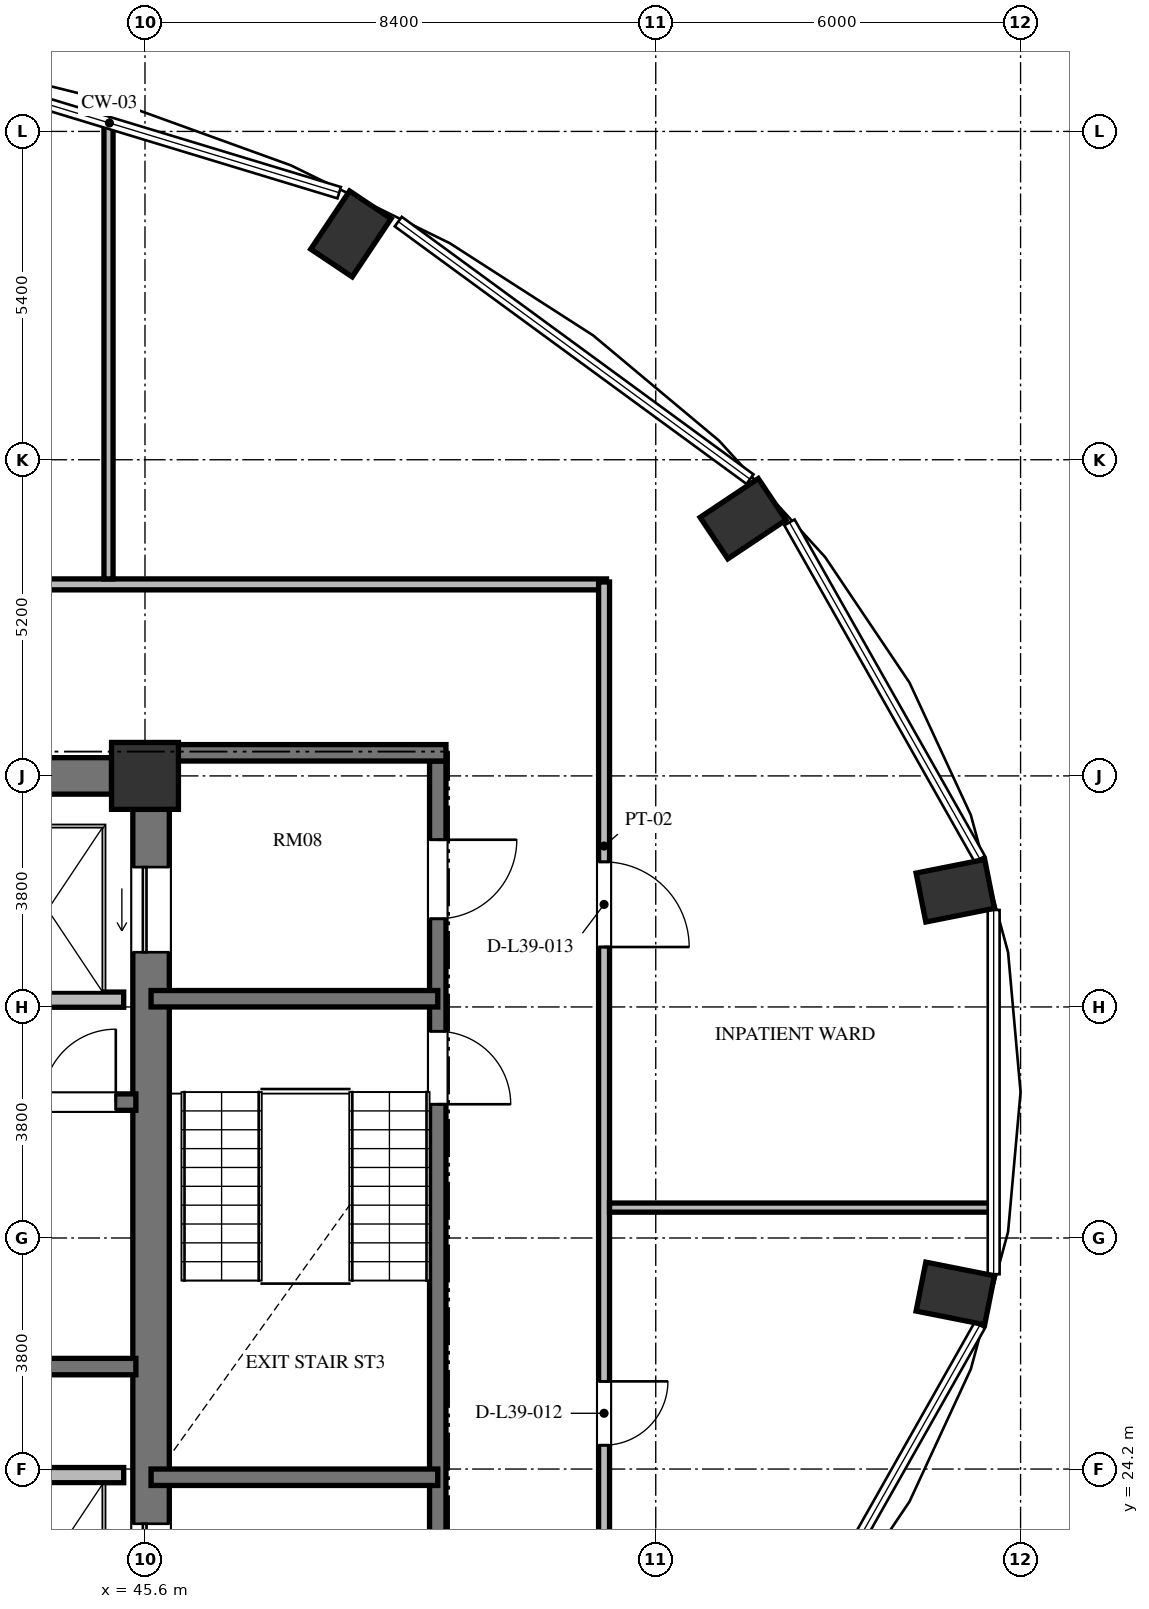
"""IFC4 building model, lengths in metres.
Left out: names, types, materials, properties, quantities, classifications, styles, units other than length and angle.
Written with IfcOpenShell. Run it as: python <this file> out.ifc"""

import sys

from ifc_helpers import new_model, si_unit, direction, frame, frame_2d, origin, origin_2d, place, context, subcontext, project, spatial, rectangle, extrude, element, fill, save


model = new_model("IFC4")
c1 = context("Model", 3, precision=1e-05, world=origin(), true_north=direction((0.0, 1.0)))
c2 = subcontext(c1, "Body", "Model", "MODEL_VIEW")
j1 = project(units=[si_unit("LENGTHUNIT", "METRE"), si_unit("PLANEANGLEUNIT", "RADIAN")], contexts=[c1])
p1 = place(None, origin())
s1 = spatial("IfcSite", under=j1, at=p1, CompositionType="ELEMENT")
p2 = place(p1, origin())
s2 = spatial("IfcBuilding", under=s1, at=p2, CompositionType="ELEMENT")
p3 = place(p2, frame((0.0, 0.0, 152.88)))
s3 = spatial("IfcBuildingStorey", under=s2, at=p3, CompositionType="ELEMENT", Elevation=152.88)
for number, where, z_axis, x_axis in (
    (1, (58.926, 27.088, 0.0), (0.0, 0.0, 1.0), (0.981, -0.195, 0.0)),
    (2, (58.926, 33.712, 0.0), (0.0, 0.0, 1.0), (0.981, 0.195, 0.0)),
    (3, (55.436, 39.831, 0.0), (0.0, 0.0, 1.0), (0.831, 0.556, 0.0)),
    (4, (48.987, 44.514, 0.0), (0.0, 0.0, 1.0), (0.556, 0.831, 0.0)),
):
    element("IfcColumn", number, at=place(p3, frame(where, z_axis=z_axis, x_axis=x_axis)), inside=s3, PredefinedType="COLUMN", context=c2, shape_type="SweptSolid", body=[
        extrude(rectangle(XDim=1.15, YDim=0.82, at=origin_2d()), origin(), (0.0, 0.0, 1.0), 3.648),
    ])
p4 = place(p3, frame((45.6, 35.6, 0.0), z_axis=(0.0, 0.0, 1.0), x_axis=(1.0, 0.0, 0.0)))
e5 = element("IfcColumn", 5, at=p4, inside=s3, PredefinedType="COLUMN", context=c2, shape_type="SweptSolid", body=[
    extrude(rectangle(XDim=1.1, YDim=1.1, at=origin_2d()), origin(), (0.0, 0.0, 1.0), 3.648),
])
p5 = place(p3, frame((45.7, 20.95, 0.0), z_axis=(0.0, 0.0, 1.0), x_axis=(0.0, 1.0, 0.0)))
e6 = element("IfcWall", 6, at=p5, inside=s3, PredefinedType="SHEAR", context=c2, shape_type="SweptSolid", body=[
    extrude(rectangle(XDim=14.1, YDim=0.6, at=frame_2d((7.05, 0.0))), origin(), (0.0, 0.0, 1.0), 3.648),
])
p6 = place(p5, frame((11.75, 0.0, 0.0)))
e7 = element("IfcOpeningElement", 7, at=p6, cuts=e6, PredefinedType="OPENING", context=c2, shape_type="SweptSolid", body=[
    extrude(rectangle(XDim=1.4, YDim=2.3, at=frame_2d((0.7, 1.15))), frame((0.0, 0.31, 0.0), z_axis=(0.0, -1.0, 0.0), x_axis=(1.0, 0.0, 0.0)), (0.0, 0.0, 1.0), 0.62),
])
p7 = place(p5, frame((0.95, 0.0, 0.0)))
e8 = element("IfcOpeningElement", 8, at=p7, cuts=e6, PredefinedType="OPENING", context=c2, shape_type="SweptSolid", body=[
    extrude(rectangle(XDim=1.4, YDim=2.3, at=frame_2d((0.7, 1.15))), frame((0.0, 0.31, 0.0), z_axis=(0.0, -1.0, 0.0), x_axis=(1.0, 0.0, 0.0)), (0.0, 0.0, 1.0), 0.62),
])
p8 = place(p3, frame((39.675, 35.6, 0.0), z_axis=(0.0, 0.0, 1.0), x_axis=(1.0, 0.0, 0.0)))
e9 = element("IfcWall", 9, at=p8, inside=s3, PredefinedType="SHEAR", context=c2, shape_type="SweptSolid", body=[
    extrude(rectangle(XDim=5.375, YDim=0.6, at=frame_2d((2.688, 0.0))), origin(), (0.0, 0.0, 1.0), 3.648),
])
p9 = place(p3, frame((37.465, 30.235, 0.0), z_axis=(0.0, 0.0, 1.0), x_axis=(1.0, 0.0, 0.0)))
e10 = element("IfcWall", 10, at=p9, inside=s3, PredefinedType="SHEAR", context=c2, shape_type="SweptSolid", body=[
    extrude(rectangle(XDim=7.985, YDim=0.27, at=frame_2d((3.992, 0.0))), origin(), (0.0, 0.0, 1.0), 3.648),
])
p10 = place(p9, frame((6.455, 0.0, 0.0)))
e11 = element("IfcOpeningElement", 11, at=p10, cuts=e10, PredefinedType="OPENING", context=c2, shape_type="SweptSolid", body=[
    extrude(rectangle(XDim=1.2, YDim=2.15, at=frame_2d((0.6, 1.075))), frame((0.0, 0.145, 0.0), z_axis=(0.0, -1.0, 0.0), x_axis=(1.0, 0.0, 0.0)), (0.0, 0.0, 1.0), 0.29),
])
p11 = place(p3, frame((37.465, 25.885, 0.0), z_axis=(0.0, 0.0, 1.0), x_axis=(1.0, 0.0, 0.0)))
e12 = element("IfcWall", 12, at=p11, inside=s3, PredefinedType="SHEAR", context=c2, shape_type="SweptSolid", body=[
    extrude(rectangle(XDim=7.985, YDim=0.27, at=frame_2d((3.992, 0.0))), origin(), (0.0, 0.0, 1.0), 3.648),
])
for number, where, z_axis, x_axis in (
    (13, (42.95, 31.92, 0.0), (0.0, 0.0, 1.0), (1.0, 0.0, 0.0)),
    (14, (42.95, 24.1, 0.0), (0.0, 0.0, 1.0), (1.0, 0.0, 0.0)),
):
    element("IfcWall", number, at=place(p3, frame(where, z_axis=z_axis, x_axis=x_axis)), inside=s3, PredefinedType="SOLIDWALL", context=c2, shape_type="SweptSolid", body=[
        extrude(rectangle(XDim=2.3, YDim=0.25, at=frame_2d((1.15, 0.0))), origin(), (0.0, 0.0, 1.0), 3.428),
    ])
p12 = place(p3, frame((50.415, 35.845, 0.0), z_axis=(0.0, 0.0, 1.0), x_axis=(0.0, -1.0, 0.0)))
e15 = element("IfcWall", 15, at=p12, inside=s3, PredefinedType="SHEAR", context=c2, shape_type="SweptSolid", body=[
    extrude(rectangle(XDim=15.825, YDim=0.27, at=frame_2d((7.913, 0.0))), origin(), (0.0, 0.0, 1.0), 3.648),
])
p13 = place(p12, frame((4.445, 0.0, 0.0)))
e16 = element("IfcOpeningElement", 16, at=p13, cuts=e15, PredefinedType="OPENING", context=c2, shape_type="SweptSolid", body=[
    extrude(rectangle(XDim=1.2, YDim=2.15, at=frame_2d((0.6, 1.075))), frame((0.0, 0.145, 0.0), z_axis=(0.0, -1.0, 0.0), x_axis=(1.0, 0.0, 0.0)), (0.0, 0.0, 1.0), 0.29),
])
p14 = place(p12, frame((1.295, 0.0, 0.0)))
e17 = element("IfcOpeningElement", 17, at=p14, cuts=e15, PredefinedType="OPENING", context=c2, shape_type="SweptSolid", body=[
    extrude(rectangle(XDim=1.3, YDim=2.2, at=frame_2d((0.65, 1.1))), frame((0.0, 0.145, 0.0), z_axis=(0.0, -1.0, 0.0), x_axis=(1.0, 0.0, 0.0)), (0.0, 0.0, 1.0), 0.29),
])
p15 = place(p12, frame((13.095, 0.0, 0.0)))
e18 = element("IfcOpeningElement", 18, at=p15, cuts=e15, PredefinedType="OPENING", context=c2, shape_type="SweptSolid", body=[
    extrude(rectangle(XDim=1.3, YDim=2.2, at=frame_2d((0.65, 1.1))), frame((0.0, 0.145, 0.0), z_axis=(0.0, -1.0, 0.0), x_axis=(1.0, 0.0, 0.0)), (0.0, 0.0, 1.0), 0.29),
])
p16 = place(p3, frame((46.0, 35.98, 0.0), z_axis=(0.0, 0.0, 1.0), x_axis=(1.0, 0.0, 0.0)))
e19 = element("IfcWall", 19, at=p16, inside=s3, PredefinedType="SHEAR", context=c2, shape_type="SweptSolid", body=[
    extrude(rectangle(XDim=4.55, YDim=0.27, at=frame_2d((2.275, 0.0))), origin(), (0.0, 0.0, 1.0), 3.648),
])
for number, where, z_axis, x_axis in (
    (20, (45.7, 31.935, 0.0), (0.0, 0.0, 1.0), (1.0, 0.0, 0.0)),
    (21, (45.7, 24.065, 0.0), (0.0, 0.0, 1.0), (1.0, 0.0, 0.0)),
):
    element("IfcWall", number, at=place(p3, frame(where, z_axis=z_axis, x_axis=x_axis)), inside=s3, PredefinedType="SHEAR", context=c2, shape_type="SweptSolid", body=[
        extrude(rectangle(XDim=4.715, YDim=0.27, at=frame_2d((2.357, 0.0))), origin(), (0.0, 0.0, 1.0), 3.648),
    ])
p17 = place(p3, frame((39.46, 38.75, 0.0), z_axis=(0.0, 0.0, 1.0), x_axis=(1.0, 0.0, 0.0)))
e22 = element("IfcWall", 22, at=p17, inside=s3, PredefinedType="PARTITIONING", context=c2, shape_type="SweptSolid", body=[
    extrude(rectangle(XDim=13.73, YDim=0.18, at=frame_2d((6.865, 0.0))), origin(), (0.0, 0.0, 1.0), 3.428),
])
p18 = place(p3, frame((53.15, 38.79, 0.0), z_axis=(0.0, 0.0, 1.0), x_axis=(0.0, -1.0, 0.0)))
e23 = element("IfcWall", 23, at=p18, inside=s3, PredefinedType="PARTITIONING", context=c2, shape_type="SweptSolid", body=[
    extrude(rectangle(XDim=17.374, YDim=0.18, at=frame_2d((8.687, 0.0))), origin(), (0.0, 0.0, 1.0), 3.428),
])
p19 = place(p18, frame((13.148, 0.0, 0.0)))
e24 = element("IfcOpeningElement", 24, at=p19, cuts=e23, PredefinedType="OPENING", context=c2, shape_type="SweptSolid", body=[
    extrude(rectangle(XDim=1.05, YDim=2.15, at=frame_2d((0.525, 1.075))), frame((0.0, 0.1, 0.0), z_axis=(0.0, -1.0, 0.0), x_axis=(1.0, 0.0, 0.0)), (0.0, 0.0, 1.0), 0.2),
])
p20 = place(p18, frame((4.604, 0.0, 0.0)))
e25 = element("IfcOpeningElement", 25, at=p20, cuts=e23, PredefinedType="OPENING", context=c2, shape_type="SweptSolid", body=[
    extrude(rectangle(XDim=1.4, YDim=2.2, at=frame_2d((0.7, 1.1))), frame((0.0, 0.1, 0.0), z_axis=(0.0, -1.0, 0.0), x_axis=(1.0, 0.0, 0.0)), (0.0, 0.0, 1.0), 0.2),
])
p21 = place(p3, frame((53.24, 28.5, 0.0), z_axis=(0.0, 0.0, 1.0), x_axis=(1.0, 0.0, 0.0)))
e26 = element("IfcWall", 26, at=p21, inside=s3, PredefinedType="PARTITIONING", context=c2, shape_type="SweptSolid", body=[
    extrude(rectangle(XDim=6.307, YDim=0.15, at=frame_2d((3.154, 0.0))), origin(), (0.0, 0.0, 1.0), 3.428),
])
p22 = place(p3, frame((45.0, 38.84, 0.0), z_axis=(0.0, 0.0, 1.0), x_axis=(0.0, 1.0, 0.0)))
e27 = element("IfcWall", 27, at=p22, inside=s3, PredefinedType="PARTITIONING", context=c2, shape_type="SweptSolid", body=[
    extrude(rectangle(XDim=7.488, YDim=0.15, at=frame_2d((3.744, 0.0))), origin(), (0.0, 0.0, 1.0), 3.428),
])
p23 = place(p10, origin())
e28 = element("IfcDoor", 28, at=p23, inside=s3, OperationType="SINGLE_SWING_RIGHT", PredefinedType="DOOR", context=c2, shape_type="SweptSolid", body=[
    extrude(rectangle(XDim=1.2, YDim=2.15, at=frame_2d((0.6, 1.075))), frame((0.0, 0.025, 0.0), z_axis=(0.0, -1.0, 0.0), x_axis=(1.0, 0.0, 0.0)), (0.0, 0.0, 1.0), 0.05),
])
fill(e11, e28)
p24 = place(p6, origin())
e29 = element("IfcDoor", 29, at=p24, inside=s3, OperationType="SLIDING_TO_LEFT", PredefinedType="DOOR", context=c2, shape_type="SweptSolid", body=[
    extrude(rectangle(XDim=1.4, YDim=2.3, at=frame_2d((0.7, 1.15))), frame((0.0, 0.025, 0.0), z_axis=(0.0, -1.0, 0.0), x_axis=(1.0, 0.0, 0.0)), (0.0, 0.0, 1.0), 0.05),
])
fill(e7, e29)
p25 = place(p7, origin())
e30 = element("IfcDoor", 30, at=p25, inside=s3, OperationType="SLIDING_TO_LEFT", PredefinedType="DOOR", context=c2, shape_type="SweptSolid", body=[
    extrude(rectangle(XDim=1.4, YDim=2.3, at=frame_2d((0.7, 1.15))), frame((0.0, 0.025, 0.0), z_axis=(0.0, -1.0, 0.0), x_axis=(1.0, 0.0, 0.0)), (0.0, 0.0, 1.0), 0.05),
])
fill(e8, e30)
p26 = place(p13, origin())
e31 = element("IfcDoor", 31, at=p26, inside=s3, OperationType="SINGLE_SWING_RIGHT", PredefinedType="DOOR", context=c2, shape_type="SweptSolid", body=[
    extrude(rectangle(XDim=1.2, YDim=2.15, at=frame_2d((0.6, 1.075))), frame((0.0, 0.025, 0.0), z_axis=(0.0, -1.0, 0.0), x_axis=(1.0, 0.0, 0.0)), (0.0, 0.0, 1.0), 0.05),
])
fill(e16, e31)
p27 = place(p14, origin())
e32 = element("IfcDoor", 32, at=p27, inside=s3, OperationType="SINGLE_SWING_LEFT", PredefinedType="DOOR", context=c2, shape_type="SweptSolid", body=[
    extrude(rectangle(XDim=1.3, YDim=2.2, at=frame_2d((0.65, 1.1))), frame((0.0, 0.025, 0.0), z_axis=(0.0, -1.0, 0.0), x_axis=(1.0, 0.0, 0.0)), (0.0, 0.0, 1.0), 0.05),
])
fill(e17, e32)
p28 = place(p19, origin())
e33 = element("IfcDoor", 33, at=p28, inside=s3, OperationType="SINGLE_SWING_LEFT", PredefinedType="DOOR", context=c2, shape_type="SweptSolid", body=[
    extrude(rectangle(XDim=1.05, YDim=2.15, at=frame_2d((0.525, 1.075))), frame((0.0, 0.025, 0.0), z_axis=(0.0, -1.0, 0.0), x_axis=(1.0, 0.0, 0.0)), (0.0, 0.0, 1.0), 0.05),
])
fill(e24, e33)
p29 = place(p20, origin())
e34 = element("IfcDoor", 34, at=p29, inside=s3, OperationType="SINGLE_SWING_RIGHT", PredefinedType="DOOR", context=c2, shape_type="SweptSolid", body=[
    extrude(rectangle(XDim=1.4, YDim=2.2, at=frame_2d((0.7, 1.1))), frame((0.0, 0.025, 0.0), z_axis=(0.0, -1.0, 0.0), x_axis=(1.0, 0.0, 0.0)), (0.0, 0.0, 1.0), 0.05),
])
fill(e25, e34)
save(model, sys.argv[1])
